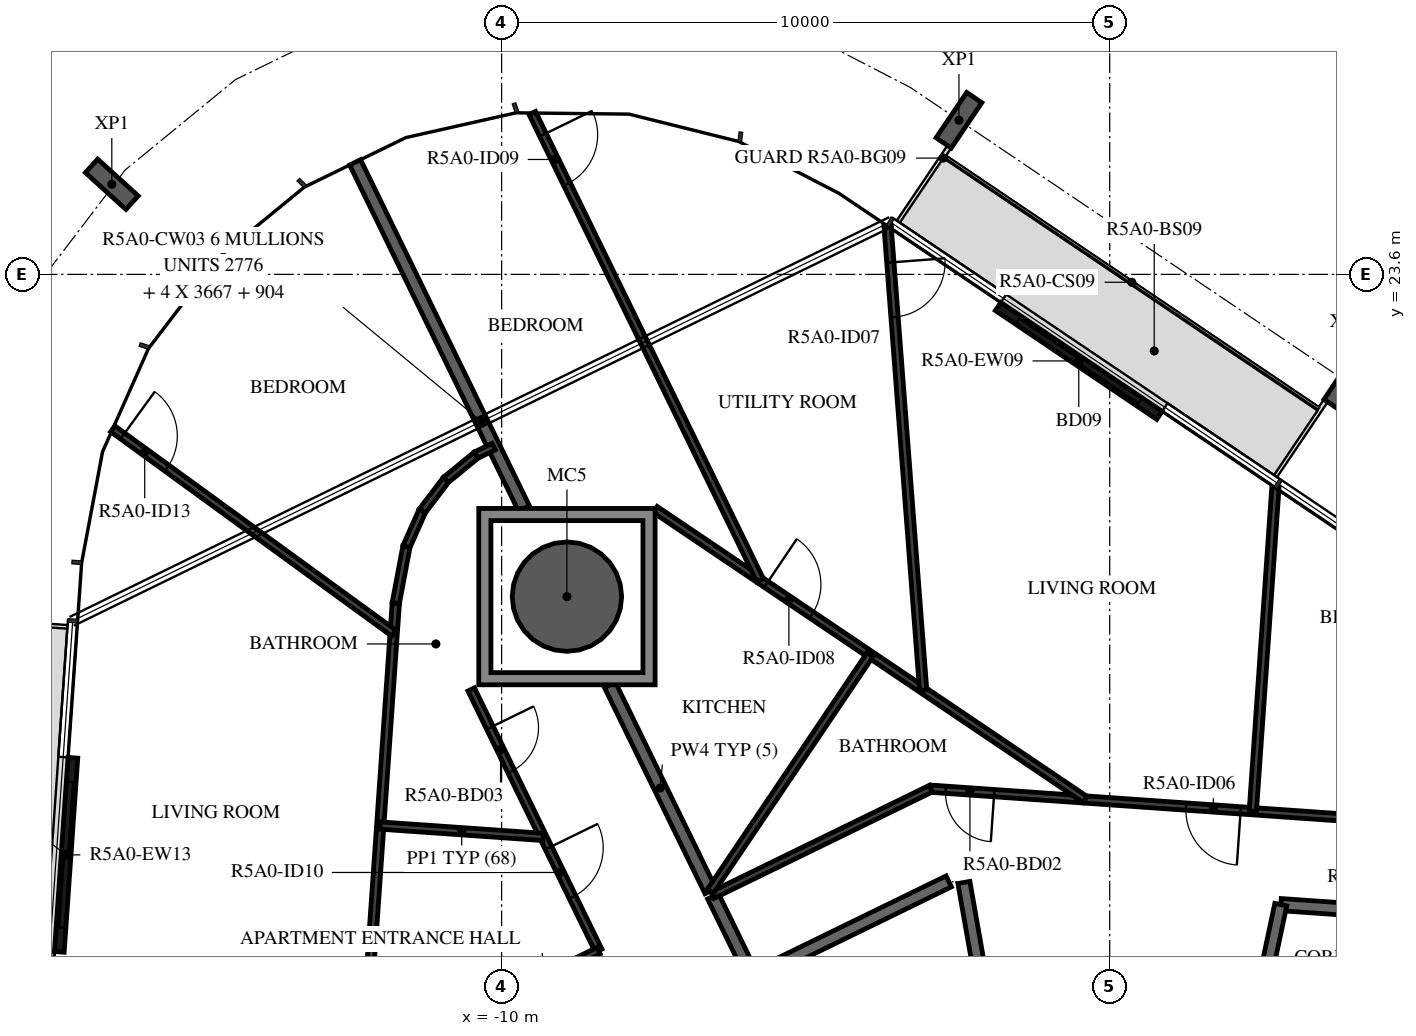
"""IFC4 building model, lengths in metres.
Left out: names, types, materials, properties, quantities, classifications, styles, units other than length and angle.
Written with IfcOpenShell. Run it as: python <this file> out.ifc"""

import sys

from ifc_helpers import new_model, si_unit, direction, frame, frame_2d, origin, origin_2d, place, context, subcontext, project, spatial, polyline, rectangle, hollow_circle, i_section, outline, extrude, element, fill, save


model = new_model("IFC4")
c1 = context("Model", 3, precision=1e-05, world=origin(), true_north=direction((0.0, 1.0)))
c2 = subcontext(c1, "Body", "Model", "MODEL_VIEW")
j1 = project(units=[si_unit("LENGTHUNIT", "METRE"), si_unit("PLANEANGLEUNIT", "RADIAN")], contexts=[c1])
p1 = place(None, origin())
s1 = spatial("IfcSite", under=j1, at=p1, CompositionType="ELEMENT")
p2 = place(p1, origin())
s2 = spatial("IfcBuilding", under=s1, at=p2, CompositionType="ELEMENT")
p3 = place(p2, frame((0.0, 0.0, 195.4)))
s3 = spatial("IfcBuildingStorey", under=s2, at=p3, CompositionType="ELEMENT", Elevation=195.4)
p4 = place(p3, frame((-8.926, 18.301, -0.38), z_axis=(0.0, 0.0, 1.0), x_axis=(1.0, 0.0, 0.0)))
e1 = element("IfcColumn", 1, at=p4, inside=s3, PredefinedType="COLUMN", context=c2, shape_type="SweptSolid", body=[
    extrude(hollow_circle(Radius=0.9, WallThickness=0.04, at=origin_2d()), origin(), (0.0, 0.0, 1.0), 3.5),
])
for number, where, z_axis, x_axis in (
    (2, (3.899, 21.833, -0.38), (0.0, 0.0, 1.0), (0.829, -0.559, 0.0)),
    (3, (-2.479, 26.135, -0.38), (0.0, 0.0, 1.0), (0.829, -0.559, 0.0)),
    (4, (-16.411, 25.082, -0.38), (0.0, 0.0, 1.0), (0.671, 0.741, 0.0)),
):
    element("IfcColumn", number, at=place(p3, frame(where, z_axis=z_axis, x_axis=x_axis)), inside=s3, PredefinedType="COLUMN", context=c2, shape_type="SweptSolid", body=[
        extrude(i_section(OverallWidth=0.3, OverallDepth=0.9, WebThickness=0.019, FlangeThickness=0.035, FilletRadius=0.03, at=origin_2d()), origin(), (0.0, 0.0, 1.0), 3.5),
    ])
p5 = place(p3, frame((0.818, 21.282, 0.0), z_axis=(0.0, 0.0, 1.0), x_axis=(-0.829044984211, 0.559181915082, 0.0)))
e5 = element("IfcWall", 5, at=p5, inside=s3, PredefinedType="STANDARD", context=c2, shape_type="SweptSolid", body=[
    extrude(rectangle(XDim=3.2, YDim=0.16, at=frame_2d((1.6, 0.0))), origin(), (0.0, 0.0, 1.0), 3.12),
])
p6 = place(p5, frame((0.4, 0.0, 0.0)))
e6 = element("IfcOpeningElement", 6, at=p6, cuts=e5, PredefinedType="OPENING", context=c2, shape_type="SweptSolid", body=[
    extrude(rectangle(XDim=2.4, YDim=2.4, at=frame_2d((1.2, 1.2))), frame((0.0, 0.09, 0.0), z_axis=(0.0, -1.0, 0.0), x_axis=(1.0, 0.0, 0.0)), (0.0, 0.0, 1.0), 0.18),
])
p7 = place(p3, frame((-17.051, 15.65, 0.0), z_axis=(0.0, 0.0, 1.0), x_axis=(-0.069734222855, -0.997565605944, 0.0)))
e7 = element("IfcWall", 7, at=p7, inside=s3, PredefinedType="STANDARD", context=c2, shape_type="SweptSolid", body=[
    extrude(rectangle(XDim=3.2, YDim=0.16, at=frame_2d((1.6, 0.0))), origin(), (0.0, 0.0, 1.0), 3.12),
])
p8 = place(p7, frame((0.4, 0.0, 0.0)))
e8 = element("IfcOpeningElement", 8, at=p8, cuts=e7, PredefinedType="OPENING", context=c2, shape_type="SweptSolid", body=[
    extrude(rectangle(XDim=2.4, YDim=2.4, at=frame_2d((1.2, 1.2))), frame((0.0, 0.09, 0.0), z_axis=(0.0, -1.0, 0.0), x_axis=(1.0, 0.0, 0.0)), (0.0, 0.0, 1.0), 0.18),
])
p9 = place(p3, frame((4.517, 13.117, 0.0), z_axis=(0.0, 0.0, 1.0), x_axis=(-0.997562153664, 0.069783591025, 0.0)))
e9 = element("IfcWall", 9, at=p9, inside=s3, PredefinedType="STANDARD", context=c2, shape_type="SweptSolid", body=[
    extrude(rectangle(XDim=1.707, YDim=0.2, at=frame_2d((0.854, 0.0))), origin(), (0.0, 0.0, 1.0), 3.12),
])
p10 = place(p3, frame((2.813, 13.236, 0.0), z_axis=(0.0, 0.0, 1.0), x_axis=(-0.207911086063, -0.978147729278, 0.0)))
e10 = element("IfcWall", 10, at=p10, inside=s3, PredefinedType="STANDARD", context=c2, shape_type="SweptSolid", body=[
    extrude(rectangle(XDim=1.618, YDim=0.2, at=frame_2d((0.809, 0.0))), origin(), (0.0, 0.0, 1.0), 3.12),
])
p11 = place(p3, frame((-2.074, 11.761, 0.0), z_axis=(0.0, 0.0, 1.0), x_axis=(-0.173740587112, 0.984791454263, 0.0)))
e11 = element("IfcWall", 11, at=p11, inside=s3, PredefinedType="STANDARD", context=c2, shape_type="SweptSolid", body=[
    extrude(rectangle(XDim=1.867, YDim=0.2, at=frame_2d((0.934, 0.0))), origin(), (0.0, 0.0, 1.0), 3.12),
])
p12 = place(p3, frame((-2.647, 13.618, 0.0), z_axis=(0.0, 0.0, 1.0), x_axis=(-0.898796543751, -0.438366026218, 0.0)))
e12 = element("IfcWall", 12, at=p12, inside=s3, PredefinedType="STANDARD", context=c2, shape_type="SweptSolid", body=[
    extrude(rectangle(XDim=7.181, YDim=0.2, at=frame_2d((3.591, 0.0))), origin(), (0.0, 0.0, 1.0), 3.12),
])
p13 = place(p3, frame((-6.522, 13.373, 0.0), z_axis=(0.0, 0.0, 1.0), x_axis=(0.438277270821, -0.8988398266, 0.0)))
e13 = element("IfcWall", 13, at=p13, inside=s3, PredefinedType="STANDARD", context=c2, shape_type="SweptSolid", body=[
    extrude(rectangle(XDim=1.479, YDim=0.2, at=frame_2d((0.74, 0.0))), origin(), (0.0, 0.0, 1.0), 3.12),
])
p14 = place(p3, frame((-8.219, 16.851, 0.0), z_axis=(0.0, 0.0, 1.0), x_axis=(0.438291091101, -0.898833087654, 0.0)))
e14 = element("IfcWall", 14, at=p14, inside=s3, PredefinedType="STANDARD", context=c2, shape_type="SweptSolid", body=[
    extrude(rectangle(XDim=3.774, YDim=0.2, at=frame_2d((1.887, 0.0))), origin(), (0.0, 0.0, 1.0), 3.12),
])
p15 = place(p3, frame((-12.409, 25.442, 0.0), z_axis=(0.0, 0.0, 1.0), x_axis=(0.43838641251, -0.898786600549, 0.0)))
e15 = element("IfcWall", 15, at=p15, inside=s3, PredefinedType="STANDARD", context=c2, shape_type="SweptSolid", body=[
    extrude(rectangle(XDim=6.333, YDim=0.2, at=frame_2d((3.166, 0.0))), origin(), (0.0, 0.0, 1.0), 3.12),
])
p16 = place(p3, frame((5.022, 14.585, 0.0), z_axis=(0.0, 0.0, 1.0), x_axis=(-0.997565118395, 0.069741197017, 0.0)))
e16 = element("IfcWall", 16, at=p16, inside=s3, PredefinedType="PARTITIONING", context=c2, shape_type="SweptSolid", body=[
    extrude(rectangle(XDim=7.985, YDim=0.12, at=frame_2d((3.993, 0.0))), origin(), (0.0, 0.0, 1.0), 3.12),
])
p17 = place(p16, frame((2.875, 0.0, 0.0)))
e17 = element("IfcOpeningElement", 17, at=p17, cuts=e16, PredefinedType="OPENING", context=c2, shape_type="SweptSolid", body=[
    extrude(rectangle(XDim=0.9, YDim=2.1, at=frame_2d((0.45, 1.05))), frame((0.0, 0.07, 0.0), z_axis=(0.0, -1.0, 0.0), x_axis=(1.0, 0.0, 0.0)), (0.0, 0.0, 1.0), 0.14),
])
p18 = place(p16, frame((6.938, 0.0, 0.0)))
e18 = element("IfcOpeningElement", 18, at=p18, cuts=e16, PredefinedType="OPENING", context=c2, shape_type="SweptSolid", body=[
    extrude(rectangle(XDim=0.8, YDim=2.1, at=frame_2d((0.4, 1.05))), frame((0.0, 0.07, 0.0), z_axis=(0.0, -1.0, 0.0), x_axis=(1.0, 0.0, 0.0)), (0.0, 0.0, 1.0), 0.14),
])
p19 = place(p3, frame((-2.943, 15.142, 0.0), z_axis=(0.0, 0.0, 1.0), x_axis=(-0.89881075705, -0.438336883014, 0.0)))
e19 = element("IfcWall", 19, at=p19, inside=s3, PredefinedType="PARTITIONING", context=c2, shape_type="SweptSolid", body=[
    extrude(rectangle(XDim=3.992, YDim=0.12, at=frame_2d((1.996, 0.0))), origin(), (0.0, 0.0, 1.0), 3.12),
])
p20 = place(p3, frame((2.725, 20.092, 0.0), z_axis=(0.0, 0.0, 1.0), x_axis=(-0.069766716578, -0.997563333958, 0.0)))
e20 = element("IfcWall", 20, at=p20, inside=s3, PredefinedType="PARTITIONING", context=c2, shape_type="SweptSolid", body=[
    extrude(rectangle(XDim=5.333, YDim=0.12, at=frame_2d((2.667, 0.0))), origin(), (0.0, 0.0, 1.0), 3.12),
])
p21 = place(p3, frame((-7.476, 19.735, 0.0), z_axis=(0.0, 0.0, 1.0), x_axis=(0.829035412992, -0.559196105142, 0.0)))
e21 = element("IfcWall", 21, at=p21, inside=s3, PredefinedType="PARTITIONING", context=c2, shape_type="SweptSolid", body=[
    extrude(rectangle(XDim=8.531, YDim=0.12, at=frame_2d((4.266, 0.0))), origin(), (0.0, 0.0, 1.0), 3.12),
])
p22 = place(p21, frame((2.204, 0.0, 0.0)))
e22 = element("IfcOpeningElement", 22, at=p22, cuts=e21, PredefinedType="OPENING", context=c2, shape_type="SweptSolid", body=[
    extrude(rectangle(XDim=0.9, YDim=2.1, at=frame_2d((0.45, 1.05))), frame((0.0, 0.07, 0.0), z_axis=(0.0, -1.0, 0.0), x_axis=(1.0, 0.0, 0.0)), (0.0, 0.0, 1.0), 0.14),
])
p23 = place(p3, frame((-3.653, 24.394, 0.0), z_axis=(0.0, 0.0, 1.0), x_axis=(0.076513576433, -0.997068539581, 0.0)))
e23 = element("IfcWall", 23, at=p23, inside=s3, PredefinedType="PARTITIONING", context=c2, shape_type="SweptSolid", body=[
    extrude(rectangle(XDim=7.655, YDim=0.12, at=frame_2d((3.827, 0.0))), origin(), (0.0, 0.0, 1.0), 3.12),
])
p24 = place(p23, frame((0.6, 0.0, 0.0)))
e24 = element("IfcOpeningElement", 24, at=p24, cuts=e23, PredefinedType="OPENING", context=c2, shape_type="SweptSolid", body=[
    extrude(rectangle(XDim=0.9, YDim=2.1, at=frame_2d((0.45, 1.05))), frame((0.0, 0.07, 0.0), z_axis=(0.0, -1.0, 0.0), x_axis=(1.0, 0.0, 0.0)), (0.0, 0.0, 1.0), 0.14),
])
p25 = place(p3, frame((-3.939, 17.35, 0.0), z_axis=(0.0, 0.0, 1.0), x_axis=(-0.559193216274, -0.829037361566, 0.0)))
e25 = element("IfcWall", 25, at=p25, inside=s3, PredefinedType="PARTITIONING", context=c2, shape_type="SweptSolid", body=[
    extrude(rectangle(XDim=4.694, YDim=0.12, at=frame_2d((2.347, 0.0))), origin(), (0.0, 0.0, 1.0), 3.12),
])
p26 = place(p3, frame((-9.496, 26.254, 0.0), z_axis=(0.0, 0.0, 1.0), x_axis=(0.438361739807, -0.89879863433, 0.0)))
e26 = element("IfcWall", 26, at=p26, inside=s3, PredefinedType="PARTITIONING", context=c2, shape_type="SweptSolid", body=[
    extrude(rectangle(XDim=8.549, YDim=0.12, at=frame_2d((4.274, 0.0))), origin(), (0.0, 0.0, 1.0), 3.12),
])
p27 = place(p26, frame((0.4, 0.0, 0.0)))
e27 = element("IfcOpeningElement", 27, at=p27, cuts=e26, PredefinedType="OPENING", context=c2, shape_type="SweptSolid", body=[
    extrude(rectangle(XDim=0.9, YDim=2.1, at=frame_2d((0.45, 1.05))), frame((0.0, 0.07, 0.0), z_axis=(0.0, -1.0, 0.0), x_axis=(1.0, 0.0, 0.0)), (0.0, 0.0, 1.0), 0.14),
])
p28 = place(p3, frame((-10.5, 16.775, 0.0), z_axis=(0.0, 0.0, 1.0), x_axis=(0.438345136783, -0.898806731761, 0.0)))
e28 = element("IfcWall", 28, at=p28, inside=s3, PredefinedType="PARTITIONING", context=c2, shape_type="SweptSolid", body=[
    extrude(rectangle(XDim=4.78, YDim=0.12, at=frame_2d((2.39, 0.0))), origin(), (0.0, 0.0, 1.0), 3.12),
])
p29 = place(p28, frame((0.7, 0.0, 0.0)))
e29 = element("IfcOpeningElement", 29, at=p29, cuts=e28, PredefinedType="OPENING", context=c2, shape_type="SweptSolid", body=[
    extrude(rectangle(XDim=0.8, YDim=2.1, at=frame_2d((0.4, 1.05))), frame((0.0, 0.07, 0.0), z_axis=(0.0, -1.0, 0.0), x_axis=(1.0, 0.0, 0.0)), (0.0, 0.0, 1.0), 0.14),
])
p30 = place(p28, frame((2.899, 0.0, 0.0)))
e30 = element("IfcOpeningElement", 30, at=p30, cuts=e28, PredefinedType="OPENING", context=c2, shape_type="SweptSolid", body=[
    extrude(rectangle(XDim=0.9, YDim=2.1, at=frame_2d((0.45, 1.05))), frame((0.0, 0.07, 0.0), z_axis=(0.0, -1.0, 0.0), x_axis=(1.0, 0.0, 0.0)), (0.0, 0.0, 1.0), 0.14),
])
p31 = place(p3, frame((-8.405, 12.479, 0.0), z_axis=(0.0, 0.0, 1.0), x_axis=(-0.898784427692, -0.438390867307, 0.0)))
e31 = element("IfcWall", 31, at=p31, inside=s3, PredefinedType="PARTITIONING", context=c2, shape_type="SweptSolid", body=[
    extrude(rectangle(XDim=1.908, YDim=0.12, at=frame_2d((0.954, 0.0))), origin(), (0.0, 0.0, 1.0), 3.12),
])
p32 = place(p3, frame((-12.439, 8.204, 0.0), z_axis=(0.0, 0.0, 1.0), x_axis=(0.069750037523, 0.997564500303, 0.0)))
e32 = element("IfcWall", 32, at=p32, inside=s3, PredefinedType="PARTITIONING", context=c2, shape_type="SweptSolid", body=[
    extrude(rectangle(XDim=10.014, YDim=0.12, at=frame_2d((5.007, 0.0))), origin(), (0.0, 0.0, 1.0), 3.12),
])
p33 = place(p32, frame((1.859, 0.0, 0.0)))
e33 = element("IfcOpeningElement", 33, at=p33, cuts=e32, PredefinedType="OPENING", context=c2, shape_type="SweptSolid", body=[
    extrude(rectangle(XDim=0.9, YDim=2.1, at=frame_2d((0.45, 1.05))), frame((0.0, 0.07, 0.0), z_axis=(0.0, -1.0, 0.0), x_axis=(1.0, 0.0, 0.0)), (0.0, 0.0, 1.0), 0.14),
])
p34 = place(p3, frame((-11.74, 18.194, 0.0), z_axis=(0.0, 0.0, 1.0), x_axis=(0.185144760846, 0.982711258474, 0.0)))
e34 = element("IfcWall", 34, at=p34, inside=s3, PredefinedType="PARTITIONING", context=c2, shape_type="SweptSolid", body=[
    extrude(rectangle(XDim=0.947, YDim=0.12, at=frame_2d((0.473, 0.0))), origin(), (0.0, 0.0, 1.0), 3.12),
])
for number, where, z_axis, x_axis in (
    (35, (-11.565, 19.125, 0.0), (0.0, 0.0, 1.0), (0.407, 0.914, 0.0)),
    (36, (-11.304, 19.711, 0.0), (0.0, 0.0, 1.0), (0.607, 0.795, 0.0)),
    (37, (-10.915, 20.221, 0.0), (0.0, 0.0, 1.0), (0.773, 0.634, 0.0)),
):
    element("IfcWall", number, at=place(p3, frame(where, z_axis=z_axis, x_axis=x_axis)), inside=s3, PredefinedType="PARTITIONING", context=c2, shape_type="SweptSolid", body=[
        extrude(rectangle(XDim=0.642, YDim=0.12, at=frame_2d((0.321, 0.0))), origin(), (0.0, 0.0, 1.0), 3.12),
    ])
p35 = place(p3, frame((-10.418, 20.628, 0.0), z_axis=(0.0, 0.0, 1.0), x_axis=(0.898943795765, 0.438063981692, 0.0)))
e38 = element("IfcWall", 38, at=p35, inside=s3, PredefinedType="PARTITIONING", context=c2, shape_type="SweptSolid", body=[
    extrude(rectangle(XDim=0.321, YDim=0.12, at=frame_2d((0.161, 0.0))), origin(), (0.0, 0.0, 1.0), 3.12),
])
p36 = place(p3, frame((-16.395, 21.061, 0.0), z_axis=(0.0, 0.0, 1.0), x_axis=(0.808810002497, -0.58807004673, 0.0)))
e39 = element("IfcWall", 39, at=p36, inside=s3, PredefinedType="PARTITIONING", context=c2, shape_type="SweptSolid", body=[
    extrude(rectangle(XDim=5.713, YDim=0.12, at=frame_2d((2.856, 0.0))), origin(), (0.0, 0.0, 1.0), 3.12),
])
p37 = place(p36, frame((0.2, 0.0, 0.0)))
e40 = element("IfcOpeningElement", 40, at=p37, cuts=e39, PredefinedType="OPENING", context=c2, shape_type="SweptSolid", body=[
    extrude(rectangle(XDim=0.9, YDim=2.1, at=frame_2d((0.45, 1.05))), frame((0.0, 0.07, 0.0), z_axis=(0.0, -1.0, 0.0), x_axis=(1.0, 0.0, 0.0)), (0.0, 0.0, 1.0), 0.14),
])
p38 = place(p3, frame((-11.996, 14.536, 0.0), z_axis=(0.0, 0.0, 1.0), x_axis=(0.997565991425, -0.069728708231, 0.0)))
e41 = element("IfcWall", 41, at=p38, inside=s3, PredefinedType="PARTITIONING", context=c2, shape_type="SweptSolid", body=[
    extrude(rectangle(XDim=2.686, YDim=0.12, at=frame_2d((1.343, 0.0))), origin(), (0.0, 0.0, 1.0), 3.12),
])
p39 = place(p3, origin())
e42 = element("IfcWall", 42, at=p39, inside=s3, PredefinedType="STANDARD", context=c2, shape_type="SweptSolid", body=[
    extrude(outline(polyline([(-7.476, 19.751), (-7.476, 16.851), (-10.376, 16.851), (-10.376, 19.751), (-7.476, 19.751)]), holes=[polyline([(-10.176, 17.051), (-7.676, 17.051), (-7.676, 19.551), (-10.176, 19.551), (-10.176, 17.051)])]), origin(), (0.0, 0.0, 1.0), 3.12),
])
p40 = place(p6, origin())
e43 = element("IfcDoor", 43, at=p40, inside=s3, OperationType="DOUBLE_DOOR_SLIDING", PredefinedType="DOOR", context=c2, shape_type="SweptSolid", body=[
    extrude(rectangle(XDim=2.4, YDim=2.4, at=frame_2d((1.2, 1.2))), frame((0.0, 0.025, 0.0), z_axis=(0.0, -1.0, 0.0), x_axis=(1.0, 0.0, 0.0)), (0.0, 0.0, 1.0), 0.05),
])
fill(e6, e43)
p41 = place(p8, origin())
e44 = element("IfcDoor", 44, at=p41, inside=s3, OperationType="DOUBLE_DOOR_SLIDING", PredefinedType="DOOR", context=c2, shape_type="SweptSolid", body=[
    extrude(rectangle(XDim=2.4, YDim=2.4, at=frame_2d((1.2, 1.2))), frame((0.0, 0.025, 0.0), z_axis=(0.0, -1.0, 0.0), x_axis=(1.0, 0.0, 0.0)), (0.0, 0.0, 1.0), 0.05),
])
fill(e8, e44)
p42 = place(p17, origin())
e45 = element("IfcDoor", 45, at=p42, inside=s3, OperationType="SINGLE_SWING_RIGHT", PredefinedType="DOOR", context=c2, shape_type="SweptSolid", body=[
    extrude(rectangle(XDim=0.9, YDim=2.1, at=frame_2d((0.45, 1.05))), frame((0.0, 0.025, 0.0), z_axis=(0.0, -1.0, 0.0), x_axis=(1.0, 0.0, 0.0)), (0.0, 0.0, 1.0), 0.05),
])
fill(e17, e45)
p43 = place(p18, origin())
e46 = element("IfcDoor", 46, at=p43, inside=s3, OperationType="SINGLE_SWING_RIGHT", PredefinedType="DOOR", context=c2, shape_type="SweptSolid", body=[
    extrude(rectangle(XDim=0.8, YDim=2.1, at=frame_2d((0.4, 1.05))), frame((0.0, 0.025, 0.0), z_axis=(0.0, -1.0, 0.0), x_axis=(1.0, 0.0, 0.0)), (0.0, 0.0, 1.0), 0.05),
])
fill(e18, e46)
p44 = place(p24, origin())
e47 = element("IfcDoor", 47, at=p44, inside=s3, OperationType="SINGLE_SWING_RIGHT", PredefinedType="DOOR", context=c2, shape_type="SweptSolid", body=[
    extrude(rectangle(XDim=0.9, YDim=2.1, at=frame_2d((0.45, 1.05))), frame((0.0, 0.025, 0.0), z_axis=(0.0, -1.0, 0.0), x_axis=(1.0, 0.0, 0.0)), (0.0, 0.0, 1.0), 0.05),
])
fill(e24, e47)
p45 = place(p22, origin())
e48 = element("IfcDoor", 48, at=p45, inside=s3, OperationType="SINGLE_SWING_LEFT", PredefinedType="DOOR", context=c2, shape_type="SweptSolid", body=[
    extrude(rectangle(XDim=0.9, YDim=2.1, at=frame_2d((0.45, 1.05))), frame((0.0, 0.025, 0.0), z_axis=(0.0, -1.0, 0.0), x_axis=(1.0, 0.0, 0.0)), (0.0, 0.0, 1.0), 0.05),
])
fill(e22, e48)
p46 = place(p27, origin())
e49 = element("IfcDoor", 49, at=p46, inside=s3, OperationType="SINGLE_SWING_RIGHT", PredefinedType="DOOR", context=c2, shape_type="SweptSolid", body=[
    extrude(rectangle(XDim=0.9, YDim=2.1, at=frame_2d((0.45, 1.05))), frame((0.0, 0.025, 0.0), z_axis=(0.0, -1.0, 0.0), x_axis=(1.0, 0.0, 0.0)), (0.0, 0.0, 1.0), 0.05),
])
fill(e27, e49)
p47 = place(p29, origin())
e50 = element("IfcDoor", 50, at=p47, inside=s3, OperationType="SINGLE_SWING_LEFT", PredefinedType="DOOR", context=c2, shape_type="SweptSolid", body=[
    extrude(rectangle(XDim=0.8, YDim=2.1, at=frame_2d((0.4, 1.05))), frame((0.0, 0.025, 0.0), z_axis=(0.0, -1.0, 0.0), x_axis=(1.0, 0.0, 0.0)), (0.0, 0.0, 1.0), 0.05),
])
fill(e29, e50)
p48 = place(p30, origin())
e51 = element("IfcDoor", 51, at=p48, inside=s3, OperationType="SINGLE_SWING_LEFT", PredefinedType="DOOR", context=c2, shape_type="SweptSolid", body=[
    extrude(rectangle(XDim=0.9, YDim=2.1, at=frame_2d((0.45, 1.05))), frame((0.0, 0.025, 0.0), z_axis=(0.0, -1.0, 0.0), x_axis=(1.0, 0.0, 0.0)), (0.0, 0.0, 1.0), 0.05),
])
fill(e30, e51)
p49 = place(p37, origin())
e52 = element("IfcDoor", 52, at=p49, inside=s3, OperationType="SINGLE_SWING_LEFT", PredefinedType="DOOR", context=c2, shape_type="SweptSolid", body=[
    extrude(rectangle(XDim=0.9, YDim=2.1, at=frame_2d((0.45, 1.05))), frame((0.0, 0.025, 0.0), z_axis=(0.0, -1.0, 0.0), x_axis=(1.0, 0.0, 0.0)), (0.0, 0.0, 1.0), 0.05),
])
fill(e40, e52)
save(model, sys.argv[1])
